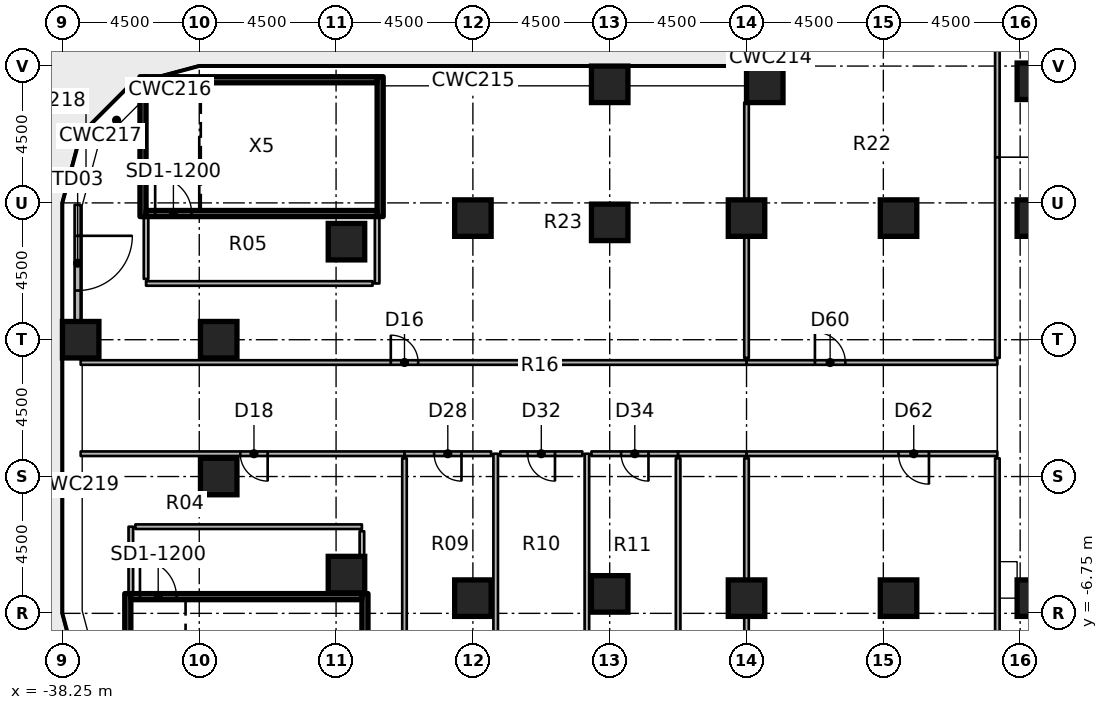
"""IFC4 building model, lengths in metres.
Left out: names, types, materials, properties, quantities, classifications, styles, units other than length and angle.
Written with IfcOpenShell. Run it as: python <this file> out.ifc"""

import sys

from ifc_helpers import new_model, si_unit, direction, frame, frame_2d, origin, origin_2d, place, context, subcontext, project, spatial, rectangle, extrude, element, fill, save


model = new_model("IFC4")
c1 = context("Model", 3, precision=1e-05, world=origin(), true_north=direction((0.0, 1.0)))
c2 = subcontext(c1, "Body", "Model", "MODEL_VIEW")
j1 = project(units=[si_unit("LENGTHUNIT", "METRE"), si_unit("PLANEANGLEUNIT", "RADIAN")], contexts=[c1])
p1 = place(None, origin())
s1 = spatial("IfcSite", under=j1, at=p1, CompositionType="ELEMENT")
p2 = place(p1, origin())
s2 = spatial("IfcBuilding", under=s1, at=p2, CompositionType="ELEMENT")
p3 = place(p2, frame((0.0, 0.0, 22.0)))
s3 = spatial("IfcBuildingStorey", under=s2, at=p3, CompositionType="ELEMENT", Elevation=22.0)
p4 = place(p3, frame((-37.65, 2.25, 0.0), z_axis=(0.0, 0.0, 1.0), x_axis=(1.0, 0.0, 0.0)))
e1 = element("IfcColumn", 1, at=p4, inside=s3, PredefinedType="COLUMN", context=c2, shape_type="SweptSolid", body=[
    extrude(rectangle(XDim=1.2, YDim=1.2, at=origin_2d()), origin(), (0.0, 0.0, 1.0), 4.55),
])
for number, where, z_axis, x_axis in (
    (2, (-33.11, -2.25, 0.0), (0.0, 0.0, 1.0), (1.0, 0.0, 0.0)),
    (3, (-33.11, 2.25, 0.0), (0.0, 0.0, 1.0), (1.0, 0.0, 0.0)),
    (4, (-28.908, -5.475, 0.0), (0.0, 0.0, 1.0), (1.0, 0.0, 0.0)),
    (5, (-28.908, 5.475, 0.0), (0.0, 0.0, 1.0), (1.0, 0.0, 0.0)),
    (6, (-24.75, -6.25, 0.0), (0.0, 0.0, 1.0), (1.0, 0.0, 0.0)),
    (7, (-24.75, 6.25, 0.0), (0.0, 0.0, 1.0), (1.0, 0.0, 0.0)),
    (8, (-20.25, -6.11, 0.0), (0.0, 0.0, 1.0), (1.0, 0.0, 0.0)),
    (9, (-20.25, 6.11, 0.0), (0.0, 0.0, 1.0), (1.0, 0.0, 0.0)),
):
    element("IfcColumn", number, at=place(p3, frame(where, z_axis=z_axis, x_axis=x_axis)), inside=s3, PredefinedType="COLUMN", context=c2, shape_type="SweptSolid", body=[
        extrude(rectangle(XDim=1.2, YDim=1.2, at=origin_2d()), origin(), (0.0, 0.0, 1.0), 4.85),
    ])
p5 = place(p3, frame((-20.25, 10.65, 0.0), z_axis=(0.0, 0.0, 1.0), x_axis=(1.0, 0.0, 0.0)))
e10 = element("IfcColumn", 10, at=p5, inside=s3, PredefinedType="COLUMN", context=c2, shape_type="SweptSolid", body=[
    extrude(rectangle(XDim=1.2, YDim=1.2, at=origin_2d()), origin(), (0.0, 0.0, 1.0), 4.55),
])
for number, where, z_axis, x_axis in (
    (11, (-15.75, -6.25, 0.0), (0.0, 0.0, 1.0), (1.0, 0.0, 0.0)),
    (12, (-15.75, 6.25, 0.0), (0.0, 0.0, 1.0), (1.0, 0.0, 0.0)),
):
    element("IfcColumn", number, at=place(p3, frame(where, z_axis=z_axis, x_axis=x_axis)), inside=s3, PredefinedType="COLUMN", context=c2, shape_type="SweptSolid", body=[
        extrude(rectangle(XDim=1.2, YDim=1.2, at=origin_2d()), origin(), (0.0, 0.0, 1.0), 4.85),
    ])
p6 = place(p3, frame((-15.15, 10.65, 0.0), z_axis=(0.0, 0.0, 1.0), x_axis=(1.0, 0.0, 0.0)))
e13 = element("IfcColumn", 13, at=p6, inside=s3, PredefinedType="COLUMN", context=c2, shape_type="SweptSolid", body=[
    extrude(rectangle(XDim=1.2, YDim=1.2, at=origin_2d()), origin(), (0.0, 0.0, 1.0), 4.55),
])
for number, where, z_axis, x_axis in (
    (14, (-10.75, -6.25, 0.0), (0.0, 0.0, 1.0), (1.0, 0.0, 0.0)),
    (15, (-10.75, 6.25, 0.0), (0.0, 0.0, 1.0), (1.0, 0.0, 0.0)),
    (16, (-6.25, -6.25, 0.0), (0.0, 0.0, 1.0), (1.0, 0.0, 0.0)),
    (17, (-6.25, 6.25, 0.0), (0.0, 0.0, 1.0), (1.0, 0.0, 0.0)),
    (18, (-6.25, 10.75, 0.0), (0.0, 0.0, 1.0), (1.0, 0.0, 0.0)),
):
    element("IfcColumn", number, at=place(p3, frame(where, z_axis=z_axis, x_axis=x_axis)), inside=s3, PredefinedType="COLUMN", context=c2, shape_type="SweptSolid", body=[
        extrude(rectangle(XDim=1.2, YDim=1.2, at=origin_2d()), origin(), (0.0, 0.0, 1.0), 4.85),
    ])
p7 = place(p3, frame((-37.75, 6.684, 0.0), z_axis=(0.0, 0.0, 1.0), x_axis=(0.0, -1.0, 0.0)))
e19 = element("IfcWall", 19, at=p7, inside=s3, PredefinedType="SOLIDWALL", context=c2, shape_type="SweptSolid", body=[
    extrude(rectangle(XDim=3.834, YDim=0.2, at=frame_2d((1.917, 0.0))), origin(), (0.0, 0.0, 1.0), 3.95),
])
p8 = place(p7, frame((1.017, 0.0, 0.0)))
e20 = element("IfcOpeningElement", 20, at=p8, cuts=e19, PredefinedType="OPENING", context=c2, shape_type="SweptSolid", body=[
    extrude(rectangle(XDim=1.8, YDim=2.4, at=frame_2d((0.9, 1.2))), frame((0.0, 0.11, 0.0), z_axis=(0.0, -1.0, 0.0), x_axis=(1.0, 0.0, 0.0)), (0.0, 0.0, 1.0), 0.22),
])
for number, where, z_axis, x_axis in (
    (21, (-36.1, -10.7, 0.0), (0.0, 0.0, 1.0), (0.0, 1.0, 0.0)),
    (22, (-28.3, -10.7, 0.0), (0.0, 0.0, 1.0), (0.0, 1.0, 0.0)),
):
    element("IfcWall", number, at=place(p3, frame(where, z_axis=z_axis, x_axis=x_axis)), inside=s3, PredefinedType="SHEAR", context=c2, shape_type="SweptSolid", body=[
        extrude(rectangle(XDim=4.6, YDim=0.2, at=frame_2d((2.3, 0.0))), origin(), (0.0, 0.0, 1.0), 4.55),
    ])
p9 = place(p3, frame((-36.0, -6.2, 0.0), z_axis=(0.0, 0.0, 1.0), x_axis=(1.0, 0.0, 0.0)))
e23 = element("IfcWall", 23, at=p9, inside=s3, PredefinedType="SHEAR", context=c2, shape_type="SweptSolid", body=[
    extrude(rectangle(XDim=7.6, YDim=0.2, at=frame_2d((3.8, 0.0))), origin(), (0.0, 0.0, 1.0), 4.55),
])
p10 = place(p9, frame((0.3, 0.0, 0.0)))
e24 = element("IfcOpeningElement", 24, at=p10, cuts=e23, PredefinedType="OPENING", context=c2, shape_type="SweptSolid", body=[
    extrude(rectangle(XDim=1.2, YDim=2.1, at=frame_2d((0.6, 1.05))), frame((0.0, 0.11, 0.0), z_axis=(0.0, -1.0, 0.0), x_axis=(1.0, 0.0, 0.0)), (0.0, 0.0, 1.0), 0.22),
])
for number, where, z_axis, x_axis in (
    (25, (-35.6, 6.3, 0.0), (0.0, 0.0, 1.0), (0.0, 1.0, 0.0)),
    (26, (-27.8, 6.3, 0.0), (0.0, 0.0, 1.0), (0.0, 1.0, 0.0)),
):
    element("IfcWall", number, at=place(p3, frame(where, z_axis=z_axis, x_axis=x_axis)), inside=s3, PredefinedType="SHEAR", context=c2, shape_type="SweptSolid", body=[
        extrude(rectangle(XDim=4.6, YDim=0.2, at=frame_2d((2.3, 0.0))), origin(), (0.0, 0.0, 1.0), 4.55),
    ])
p11 = place(p3, frame((-35.5, 6.4, 0.0), z_axis=(0.0, 0.0, 1.0), x_axis=(1.0, 0.0, 0.0)))
e27 = element("IfcWall", 27, at=p11, inside=s3, PredefinedType="SHEAR", context=c2, shape_type="SweptSolid", body=[
    extrude(rectangle(XDim=7.6, YDim=0.2, at=frame_2d((3.8, 0.0))), origin(), (0.0, 0.0, 1.0), 4.55),
])
p12 = place(p11, frame((0.3, 0.0, 0.0)))
e28 = element("IfcOpeningElement", 28, at=p12, cuts=e27, PredefinedType="OPENING", context=c2, shape_type="SweptSolid", body=[
    extrude(rectangle(XDim=1.2, YDim=2.1, at=frame_2d((0.6, 1.05))), frame((0.0, 0.11, 0.0), z_axis=(0.0, -1.0, 0.0), x_axis=(1.0, 0.0, 0.0)), (0.0, 0.0, 1.0), 0.22),
])
p13 = place(p3, frame((-35.5, 10.8, 0.0), z_axis=(0.0, 0.0, 1.0), x_axis=(1.0, 0.0, 0.0)))
e29 = element("IfcWall", 29, at=p13, inside=s3, PredefinedType="SHEAR", context=c2, shape_type="SweptSolid", body=[
    extrude(rectangle(XDim=7.6, YDim=0.2, at=frame_2d((3.8, 0.0))), origin(), (0.0, 0.0, 1.0), 4.55),
])
p14 = place(p3, frame((-36.0, -6.1, 0.0), z_axis=(0.0, 0.0, 1.0), x_axis=(0.0, 1.0, 0.0)))
e30 = element("IfcWall", 30, at=p14, inside=s3, PredefinedType="PARTITIONING", context=c2, shape_type="SweptSolid", body=[
    extrude(rectangle(XDim=2.2, YDim=0.15, at=frame_2d((1.1, 0.0))), origin(), (0.0, 0.0, 1.0), 4.55),
])
p15 = place(p3, frame((-35.85, -3.9, 0.0), z_axis=(0.0, 0.0, 1.0), x_axis=(1.0, 0.0, 0.0)))
e31 = element("IfcWall", 31, at=p15, inside=s3, PredefinedType="PARTITIONING", context=c2, shape_type="SweptSolid", body=[
    extrude(rectangle(XDim=7.45, YDim=0.15, at=frame_2d((3.725, 0.0))), origin(), (0.0, 0.0, 1.0), 3.93),
])
p16 = place(p3, frame((-28.4, -4.05, 0.0), z_axis=(0.0, 0.0, 1.0), x_axis=(0.0, -1.0, 0.0)))
e32 = element("IfcWall", 32, at=p16, inside=s3, PredefinedType="PARTITIONING", context=c2, shape_type="SweptSolid", body=[
    extrude(rectangle(XDim=0.825, YDim=0.15, at=frame_2d((0.413, 0.0))), origin(), (0.0, 0.0, 1.0), 4.55),
])
p17 = place(p3, frame((-27.9, 6.3, 0.0), z_axis=(0.0, 0.0, 1.0), x_axis=(0.0, -1.0, 0.0)))
e33 = element("IfcWall", 33, at=p17, inside=s3, PredefinedType="PARTITIONING", context=c2, shape_type="SweptSolid", body=[
    extrude(rectangle(XDim=2.2, YDim=0.15, at=frame_2d((1.1, 0.0))), origin(), (0.0, 0.0, 1.0), 3.93),
])
p18 = place(p3, frame((-28.05, 4.1, 0.0), z_axis=(0.0, 0.0, 1.0), x_axis=(-1.0, 0.0, 0.0)))
e34 = element("IfcWall", 34, at=p18, inside=s3, PredefinedType="PARTITIONING", context=c2, shape_type="SweptSolid", body=[
    extrude(rectangle(XDim=7.45, YDim=0.15, at=frame_2d((3.725, 0.0))), origin(), (0.0, 0.0, 1.0), 3.93),
])
p19 = place(p3, frame((-35.5, 4.25, 0.0), z_axis=(0.0, 0.0, 1.0), x_axis=(0.0, 1.0, 0.0)))
e35 = element("IfcWall", 35, at=p19, inside=s3, PredefinedType="PARTITIONING", context=c2, shape_type="SweptSolid", body=[
    extrude(rectangle(XDim=2.05, YDim=0.15, at=frame_2d((1.025, 0.0))), origin(), (0.0, 0.0, 1.0), 4.55),
])
p20 = place(p3, frame((-24.0, -1.5, 0.0), z_axis=(0.0, 0.0, 1.0), x_axis=(0.0, -1.0, 0.0)))
e36 = element("IfcWall", 36, at=p20, inside=s3, PredefinedType="PARTITIONING", context=c2, shape_type="SweptSolid", body=[
    extrude(rectangle(XDim=6.0, YDim=0.15, at=frame_2d((3.0, 0.0))), origin(), (0.0, 0.0, 1.0), 3.93),
])
p21 = place(p3, frame((-24.15, -1.5, 0.0), z_axis=(0.0, 0.0, 1.0), x_axis=(-1.0, 0.0, 0.0)))
e37 = element("IfcWall", 37, at=p21, inside=s3, PredefinedType="PARTITIONING", context=c2, shape_type="SweptSolid", body=[
    extrude(rectangle(XDim=2.85, YDim=0.15, at=frame_2d((1.425, 0.0))), origin(), (0.0, 0.0, 1.0), 4.063),
])
p22 = place(p21, frame((0.975, 0.0, 0.0)))
e38 = element("IfcOpeningElement", 38, at=p22, cuts=e37, PredefinedType="OPENING", context=c2, shape_type="SweptSolid", body=[
    extrude(rectangle(XDim=0.9, YDim=2.1, at=frame_2d((0.45, 1.05))), frame((0.0, 0.085, 0.0), z_axis=(0.0, -1.0, 0.0), x_axis=(1.0, 0.0, 0.0)), (0.0, 0.0, 1.0), 0.17),
])
p23 = place(p3, frame((-27.0, -7.35, 0.0), z_axis=(0.0, 0.0, 1.0), x_axis=(0.0, 1.0, 0.0)))
e39 = element("IfcWall", 39, at=p23, inside=s3, PredefinedType="PARTITIONING", context=c2, shape_type="SweptSolid", body=[
    extrude(rectangle(XDim=5.7, YDim=0.15, at=frame_2d((2.85, 0.0))), origin(), (0.0, 0.0, 1.0), 3.93),
])
p24 = place(p3, frame((-21.0, -1.5, 0.0), z_axis=(0.0, 0.0, 1.0), x_axis=(0.0, -1.0, 0.0)))
e40 = element("IfcWall", 40, at=p24, inside=s3, PredefinedType="PARTITIONING", context=c2, shape_type="SweptSolid", body=[
    extrude(rectangle(XDim=6.0, YDim=0.15, at=frame_2d((3.0, 0.0))), origin(), (0.0, 0.0, 1.0), 3.93),
])
p25 = place(p3, frame((-21.15, -1.5, 0.0), z_axis=(0.0, 0.0, 1.0), x_axis=(-1.0, 0.0, 0.0)))
e41 = element("IfcWall", 41, at=p25, inside=s3, PredefinedType="PARTITIONING", context=c2, shape_type="SweptSolid", body=[
    extrude(rectangle(XDim=2.7, YDim=0.15, at=frame_2d((1.35, 0.0))), origin(), (0.0, 0.0, 1.0), 4.55),
])
p26 = place(p25, frame((0.9, 0.0, 0.0)))
e42 = element("IfcOpeningElement", 42, at=p26, cuts=e41, PredefinedType="OPENING", context=c2, shape_type="SweptSolid", body=[
    extrude(rectangle(XDim=0.9, YDim=2.1, at=frame_2d((0.45, 1.05))), frame((0.0, 0.085, 0.0), z_axis=(0.0, -1.0, 0.0), x_axis=(1.0, 0.0, 0.0)), (0.0, 0.0, 1.0), 0.17),
])
p27 = place(p3, frame((-18.0, -1.5, 0.0), z_axis=(0.0, 0.0, 1.0), x_axis=(-1.0, 0.0, 0.0)))
e43 = element("IfcWall", 43, at=p27, inside=s3, PredefinedType="PARTITIONING", context=c2, shape_type="SweptSolid", body=[
    extrude(rectangle(XDim=2.85, YDim=0.15, at=frame_2d((1.425, 0.0))), origin(), (0.0, 0.0, 1.0), 4.063),
])
p28 = place(p27, frame((0.975, 0.0, 0.0)))
e44 = element("IfcOpeningElement", 44, at=p28, cuts=e43, PredefinedType="OPENING", context=c2, shape_type="SweptSolid", body=[
    extrude(rectangle(XDim=0.9, YDim=2.1, at=frame_2d((0.45, 1.05))), frame((0.0, 0.085, 0.0), z_axis=(0.0, -1.0, 0.0), x_axis=(1.0, 0.0, 0.0)), (0.0, 0.0, 1.0), 0.17),
])
p29 = place(p3, frame((-18.0, -1.65, 0.0), z_axis=(0.0, 0.0, 1.0), x_axis=(0.0, -1.0, 0.0)))
e45 = element("IfcWall", 45, at=p29, inside=s3, PredefinedType="PARTITIONING", context=c2, shape_type="SweptSolid", body=[
    extrude(rectangle(XDim=5.85, YDim=0.15, at=frame_2d((2.925, 0.0))), origin(), (0.0, 0.0, 1.0), 3.93),
])
p30 = place(p3, frame((-7.5, 8.25, 0.0), z_axis=(0.0, 0.0, 1.0), x_axis=(0.0, 1.0, 0.0)))
e46 = element("IfcWall", 46, at=p30, inside=s3, PredefinedType="PARTITIONING", context=c2, shape_type="SweptSolid", body=[
    extrude(rectangle(XDim=7.5, YDim=0.15, at=frame_2d((3.75, 0.0))), origin(), (0.0, 0.0, 1.0), 3.93),
])
p31 = place(p30, frame((4.5, 0.0, 0.0)))
e47 = element("IfcOpeningElement", 47, at=p31, cuts=e46, PredefinedType="OPENING", context=c2, shape_type="SweptSolid", body=[
    extrude(rectangle(XDim=1.0, YDim=2.1, at=frame_2d((0.5, 1.05))), frame((0.0, 0.085, 0.0), z_axis=(0.0, -1.0, 0.0), x_axis=(1.0, 0.0, 0.0)), (0.0, 0.0, 1.0), 0.17),
])
p32 = place(p3, frame((-15.75, 1.5, 0.0), z_axis=(0.0, 0.0, 1.0), x_axis=(1.0, 0.0, 0.0)))
e48 = element("IfcWall", 48, at=p32, inside=s3, PredefinedType="PARTITIONING", context=c2, shape_type="SweptSolid", body=[
    extrude(rectangle(XDim=8.25, YDim=0.15, at=frame_2d((4.125, 0.0))), origin(), (0.0, 0.0, 1.0), 4.063),
])
p33 = place(p32, frame((2.25, 0.0, 0.0)))
e49 = element("IfcOpeningElement", 49, at=p33, cuts=e48, PredefinedType="OPENING", context=c2, shape_type="SweptSolid", body=[
    extrude(rectangle(XDim=1.0, YDim=2.1, at=frame_2d((0.5, 1.05))), frame((0.0, 0.085, 0.0), z_axis=(0.0, -1.0, 0.0), x_axis=(1.0, 0.0, 0.0)), (0.0, 0.0, 1.0), 0.17),
])
p34 = place(p3, frame((-37.65, 1.5, 0.0), z_axis=(0.0, 0.0, 1.0), x_axis=(1.0, 0.0, 0.0)))
e50 = element("IfcWall", 50, at=p34, inside=s3, PredefinedType="PARTITIONING", context=c2, shape_type="SweptSolid", body=[
    extrude(rectangle(XDim=21.9, YDim=0.15, at=frame_2d((10.95, 0.0))), origin(), (0.0, 0.0, 1.0), 3.93),
])
p35 = place(p34, frame((10.2, 0.0, 0.0)))
e51 = element("IfcOpeningElement", 51, at=p35, cuts=e50, PredefinedType="OPENING", context=c2, shape_type="SweptSolid", body=[
    extrude(rectangle(XDim=0.9, YDim=2.1, at=frame_2d((0.45, 1.05))), frame((0.0, 0.085, 0.0), z_axis=(0.0, -1.0, 0.0), x_axis=(1.0, 0.0, 0.0)), (0.0, 0.0, 1.0), 0.17),
])
p36 = place(p3, frame((-7.5, -1.5, 0.0), z_axis=(0.0, 0.0, 1.0), x_axis=(-1.0, 0.0, 0.0)))
e52 = element("IfcWall", 52, at=p36, inside=s3, PredefinedType="PARTITIONING", context=c2, shape_type="SweptSolid", body=[
    extrude(rectangle(XDim=8.25, YDim=0.15, at=frame_2d((4.125, 0.0))), origin(), (0.0, 0.0, 1.0), 4.063),
])
p37 = place(p36, frame((2.25, 0.0, 0.0)))
e53 = element("IfcOpeningElement", 53, at=p37, cuts=e52, PredefinedType="OPENING", context=c2, shape_type="SweptSolid", body=[
    extrude(rectangle(XDim=1.0, YDim=2.1, at=frame_2d((0.5, 1.05))), frame((0.0, 0.085, 0.0), z_axis=(0.0, -1.0, 0.0), x_axis=(1.0, 0.0, 0.0)), (0.0, 0.0, 1.0), 0.17),
])
p38 = place(p3, frame((-27.0, -1.5, 0.0), z_axis=(0.0, 0.0, 1.0), x_axis=(-1.0, 0.0, 0.0)))
e54 = element("IfcWall", 54, at=p38, inside=s3, PredefinedType="PARTITIONING", context=c2, shape_type="SweptSolid", body=[
    extrude(rectangle(XDim=10.65, YDim=0.15, at=frame_2d((5.325, 0.0))), origin(), (0.0, 0.0, 1.0), 3.93),
])
p39 = place(p38, frame((4.5, 0.0, 0.0)))
e55 = element("IfcOpeningElement", 55, at=p39, cuts=e54, PredefinedType="OPENING", context=c2, shape_type="SweptSolid", body=[
    extrude(rectangle(XDim=0.9, YDim=2.1, at=frame_2d((0.45, 1.05))), frame((0.0, 0.085, 0.0), z_axis=(0.0, -1.0, 0.0), x_axis=(1.0, 0.0, 0.0)), (0.0, 0.0, 1.0), 0.17),
])
p40 = place(p3, frame((-15.75, -1.5, 0.0), z_axis=(0.0, 0.0, 1.0), x_axis=(-1.0, 0.0, 0.0)))
e56 = element("IfcWall", 56, at=p40, inside=s3, PredefinedType="PARTITIONING", context=c2, shape_type="SweptSolid", body=[
    extrude(rectangle(XDim=2.25, YDim=0.15, at=frame_2d((1.125, 0.0))), origin(), (0.0, 0.0, 1.0), 4.063),
])
p41 = place(p3, frame((-15.75, 1.65, 0.0), z_axis=(0.0, 0.0, 1.0), x_axis=(0.0, 1.0, 0.0)))
e57 = element("IfcWall", 57, at=p41, inside=s3, PredefinedType="PARTITIONING", context=c2, shape_type="SweptSolid", body=[
    extrude(rectangle(XDim=4.0, YDim=0.15, at=frame_2d((2.0, 0.0))), origin(), (0.0, 0.0, 1.0), 4.063),
])
p42 = place(p3, frame((-15.75, 6.85, 0.0), z_axis=(0.0, 0.0, 1.0), x_axis=(0.0, 1.0, 0.0)))
e58 = element("IfcWall", 58, at=p42, inside=s3, PredefinedType="PARTITIONING", context=c2, shape_type="SweptSolid", body=[
    extrude(rectangle(XDim=3.2, YDim=0.15, at=frame_2d((1.6, 0.0))), origin(), (0.0, 0.0, 1.0), 4.55),
])
p43 = place(p3, frame((-7.5, 8.25, 0.0), z_axis=(0.0, 0.0, 1.0), x_axis=(0.0, -1.0, 0.0)))
e59 = element("IfcWall", 59, at=p43, inside=s3, PredefinedType="PARTITIONING", context=c2, shape_type="SweptSolid", body=[
    extrude(rectangle(XDim=6.6, YDim=0.15, at=frame_2d((3.3, 0.0))), origin(), (0.0, 0.0, 1.0), 3.911),
])
p44 = place(p3, frame((-15.75, -10.05, 0.0), z_axis=(0.0, 0.0, 1.0), x_axis=(0.0, 1.0, 0.0)))
e60 = element("IfcWall", 60, at=p44, inside=s3, PredefinedType="PARTITIONING", context=c2, shape_type="SweptSolid", body=[
    extrude(rectangle(XDim=3.2, YDim=0.15, at=frame_2d((1.6, 0.0))), origin(), (0.0, 0.0, 1.0), 4.55),
])
p45 = place(p3, frame((-15.75, -5.65, 0.0), z_axis=(0.0, 0.0, 1.0), x_axis=(0.0, 1.0, 0.0)))
e61 = element("IfcWall", 61, at=p45, inside=s3, PredefinedType="PARTITIONING", context=c2, shape_type="SweptSolid", body=[
    extrude(rectangle(XDim=4.0, YDim=0.15, at=frame_2d((2.0, 0.0))), origin(), (0.0, 0.0, 1.0), 4.063),
])
p46 = place(p3, frame((-7.5, -1.65, 0.0), z_axis=(0.0, 0.0, 1.0), x_axis=(0.0, -1.0, 0.0)))
e62 = element("IfcWall", 62, at=p46, inside=s3, PredefinedType="PARTITIONING", context=c2, shape_type="SweptSolid", body=[
    extrude(rectangle(XDim=6.6, YDim=0.15, at=frame_2d((3.3, 0.0))), origin(), (0.0, 0.0, 1.0), 3.911),
])
p47 = place(p8, origin())
e63 = element("IfcDoor", 63, at=p47, inside=s3, OperationType="SINGLE_SWING_LEFT", PredefinedType="DOOR", context=c2, shape_type="SweptSolid", body=[
    extrude(rectangle(XDim=1.8, YDim=2.4, at=frame_2d((0.9, 1.2))), frame((0.0, 0.025, 0.0), z_axis=(0.0, -1.0, 0.0), x_axis=(1.0, 0.0, 0.0)), (0.0, 0.0, 1.0), 0.05),
])
fill(e20, e63)
p48 = place(p10, origin())
e64 = element("IfcDoor", 64, at=p48, inside=s3, OperationType="SINGLE_SWING_RIGHT", PredefinedType="DOOR", context=c2, shape_type="SweptSolid", body=[
    extrude(rectangle(XDim=1.2, YDim=2.1, at=frame_2d((0.6, 1.05))), frame((0.0, 0.025, 0.0), z_axis=(0.0, -1.0, 0.0), x_axis=(1.0, 0.0, 0.0)), (0.0, 0.0, 1.0), 0.05),
])
fill(e24, e64)
p49 = place(p12, origin())
e65 = element("IfcDoor", 65, at=p49, inside=s3, OperationType="SINGLE_SWING_RIGHT", PredefinedType="DOOR", context=c2, shape_type="SweptSolid", body=[
    extrude(rectangle(XDim=1.2, YDim=2.1, at=frame_2d((0.6, 1.05))), frame((0.0, 0.025, 0.0), z_axis=(0.0, -1.0, 0.0), x_axis=(1.0, 0.0, 0.0)), (0.0, 0.0, 1.0), 0.05),
])
fill(e28, e65)
p50 = place(p22, origin())
e66 = element("IfcDoor", 66, at=p50, inside=s3, OperationType="SINGLE_SWING_LEFT", PredefinedType="DOOR", context=c2, shape_type="SweptSolid", body=[
    extrude(rectangle(XDim=0.9, YDim=2.1, at=frame_2d((0.45, 1.05))), frame((0.0, 0.025, 0.0), z_axis=(0.0, -1.0, 0.0), x_axis=(1.0, 0.0, 0.0)), (0.0, 0.0, 1.0), 0.05),
])
fill(e38, e66)
p51 = place(p26, origin())
e67 = element("IfcDoor", 67, at=p51, inside=s3, OperationType="SINGLE_SWING_LEFT", PredefinedType="DOOR", context=c2, shape_type="SweptSolid", body=[
    extrude(rectangle(XDim=0.9, YDim=2.1, at=frame_2d((0.45, 1.05))), frame((0.0, 0.025, 0.0), z_axis=(0.0, -1.0, 0.0), x_axis=(1.0, 0.0, 0.0)), (0.0, 0.0, 1.0), 0.05),
])
fill(e42, e67)
p52 = place(p28, origin())
e68 = element("IfcDoor", 68, at=p52, inside=s3, OperationType="SINGLE_SWING_LEFT", PredefinedType="DOOR", context=c2, shape_type="SweptSolid", body=[
    extrude(rectangle(XDim=0.9, YDim=2.1, at=frame_2d((0.45, 1.05))), frame((0.0, 0.025, 0.0), z_axis=(0.0, -1.0, 0.0), x_axis=(1.0, 0.0, 0.0)), (0.0, 0.0, 1.0), 0.05),
])
fill(e44, e68)
p53 = place(p33, origin())
e69 = element("IfcDoor", 69, at=p53, inside=s3, OperationType="SINGLE_SWING_LEFT", PredefinedType="DOOR", context=c2, shape_type="SweptSolid", body=[
    extrude(rectangle(XDim=1.0, YDim=2.1, at=frame_2d((0.5, 1.05))), frame((0.0, 0.025, 0.0), z_axis=(0.0, -1.0, 0.0), x_axis=(1.0, 0.0, 0.0)), (0.0, 0.0, 1.0), 0.05),
])
fill(e49, e69)
p54 = place(p35, origin())
e70 = element("IfcDoor", 70, at=p54, inside=s3, OperationType="SINGLE_SWING_LEFT", PredefinedType="DOOR", context=c2, shape_type="SweptSolid", body=[
    extrude(rectangle(XDim=0.9, YDim=2.1, at=frame_2d((0.45, 1.05))), frame((0.0, 0.025, 0.0), z_axis=(0.0, -1.0, 0.0), x_axis=(1.0, 0.0, 0.0)), (0.0, 0.0, 1.0), 0.05),
])
fill(e51, e70)
p55 = place(p37, origin())
e71 = element("IfcDoor", 71, at=p55, inside=s3, OperationType="SINGLE_SWING_LEFT", PredefinedType="DOOR", context=c2, shape_type="SweptSolid", body=[
    extrude(rectangle(XDim=1.0, YDim=2.1, at=frame_2d((0.5, 1.05))), frame((0.0, 0.025, 0.0), z_axis=(0.0, -1.0, 0.0), x_axis=(1.0, 0.0, 0.0)), (0.0, 0.0, 1.0), 0.05),
])
fill(e53, e71)
p56 = place(p39, origin())
e72 = element("IfcDoor", 72, at=p56, inside=s3, OperationType="SINGLE_SWING_LEFT", PredefinedType="DOOR", context=c2, shape_type="SweptSolid", body=[
    extrude(rectangle(XDim=0.9, YDim=2.1, at=frame_2d((0.45, 1.05))), frame((0.0, 0.025, 0.0), z_axis=(0.0, -1.0, 0.0), x_axis=(1.0, 0.0, 0.0)), (0.0, 0.0, 1.0), 0.05),
])
fill(e55, e72)
save(model, sys.argv[1])
